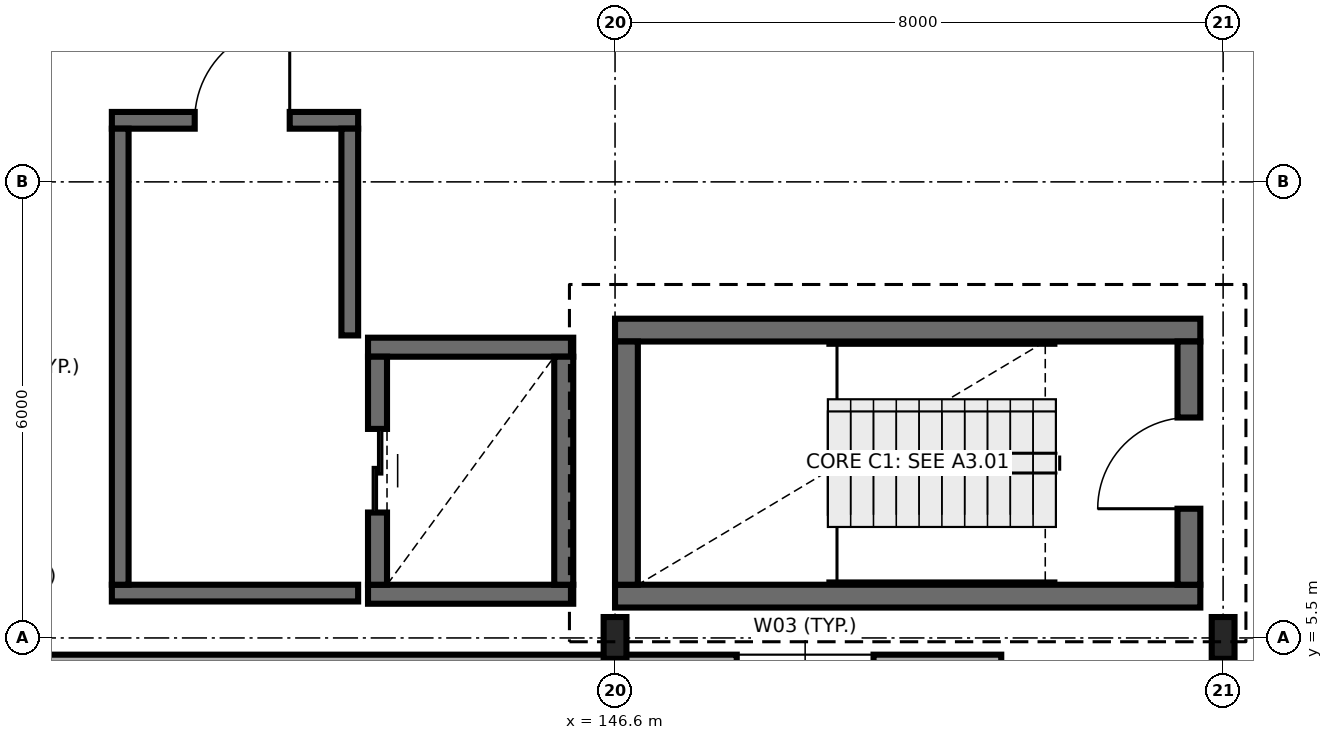
"""IFC4 building model, lengths in metres.
Left out: names, types, materials, properties, quantities, classifications, styles, units other than length and angle.
Written with IfcOpenShell. Run it as: python <this file> out.ifc"""

import sys

from ifc_helpers import new_model, si_unit, direction, frame, frame_2d, origin, origin_2d, place, context, subcontext, project, spatial, rectangle, i_section, extrude, element, fill, save


model = new_model("IFC4")
c1 = context("Model", 3, precision=1e-05, world=origin(), true_north=direction((0.0, 1.0)))
c2 = subcontext(c1, "Body", "Model", "MODEL_VIEW")
j1 = project(units=[si_unit("LENGTHUNIT", "METRE"), si_unit("PLANEANGLEUNIT", "RADIAN")], contexts=[c1])
p1 = place(None, origin())
s1 = spatial("IfcSite", under=j1, at=p1, CompositionType="ELEMENT")
p2 = place(p1, origin())
s2 = spatial("IfcBuilding", under=s1, at=p2, CompositionType="ELEMENT")
p3 = place(p2, frame((0.0, 0.0, 22.8)))
s3 = spatial("IfcBuildingStorey", under=s2, at=p3, CompositionType="ELEMENT", Elevation=22.8)
for number, where, z_axis, x_axis in (
    (1, (146.6, 5.5, 0.0), (0.0, 0.0, 1.0), (1.0, 0.0, 0.0)),
    (2, (154.6, 5.5, 0.0), (0.0, 0.0, 1.0), (1.0, 0.0, 0.0)),
):
    element("IfcColumn", number, at=place(p3, frame(where, z_axis=z_axis, x_axis=x_axis)), inside=s3, PredefinedType="COLUMN", context=c2, shape_type="SweptSolid", body=[
        extrude(i_section(OverallWidth=0.3, OverallDepth=0.55, WebThickness=0.015, FlangeThickness=0.029, FilletRadius=0.027, at=origin_2d()), origin(), (0.0, 0.0, 1.0), 3.9),
    ])
for number, where, z_axis, x_axis in (
    (3, (146.6, 6.05, 0.0), (0.0, 0.0, 1.0), (1.0, 0.0, 0.0)),
    (4, (154.3, 9.55, 0.0), (0.0, 0.0, 1.0), (-1.0, 0.0, 0.0)),
):
    element("IfcWall", number, at=place(p3, frame(where, z_axis=z_axis, x_axis=x_axis)), inside=s3, PredefinedType="SHEAR", context=c2, shape_type="SweptSolid", body=[
        extrude(rectangle(XDim=7.7, YDim=0.3, at=frame_2d((3.85, 0.0))), origin(), (0.0, 0.0, 1.0), 3.9),
    ])
p4 = place(p3, frame((146.75, 9.4, 0.0), z_axis=(0.0, 0.0, 1.0), x_axis=(0.0, -1.0, 0.0)))
e5 = element("IfcWall", 5, at=p4, inside=s3, PredefinedType="SHEAR", context=c2, shape_type="SweptSolid", body=[
    extrude(rectangle(XDim=3.2, YDim=0.3, at=frame_2d((1.6, 0.0))), origin(), (0.0, 0.0, 1.0), 3.9),
])
p5 = place(p3, frame((154.15, 6.2, 0.0), z_axis=(0.0, 0.0, 1.0), x_axis=(0.0, 1.0, 0.0)))
e6 = element("IfcWall", 6, at=p5, inside=s3, PredefinedType="SHEAR", context=c2, shape_type="SweptSolid", body=[
    extrude(rectangle(XDim=3.2, YDim=0.3, at=frame_2d((1.6, 0.0))), origin(), (0.0, 0.0, 1.0), 3.9),
])
p6 = place(p5, frame((1.0, 0.0, 0.0)))
e7 = element("IfcOpeningElement", 7, at=p6, cuts=e6, PredefinedType="OPENING", context=c2, shape_type="SweptSolid", body=[
    extrude(rectangle(XDim=1.2, YDim=2.15, at=frame_2d((0.6, 1.075))), frame((0.0, 0.16, 0.0), z_axis=(0.0, -1.0, 0.0), x_axis=(1.0, 0.0, 0.0)), (0.0, 0.0, 1.0), 0.32),
])
for number, where, z_axis, x_axis in (
    (8, (143.35, 6.075, 0.0), (0.0, 0.0, 1.0), (1.0, 0.0, 0.0)),
    (9, (146.05, 9.325, 0.0), (0.0, 0.0, 1.0), (-1.0, 0.0, 0.0)),
):
    element("IfcWall", number, at=place(p3, frame(where, z_axis=z_axis, x_axis=x_axis)), inside=s3, PredefinedType="SHEAR", context=c2, shape_type="SweptSolid", body=[
        extrude(rectangle(XDim=2.7, YDim=0.25, at=frame_2d((1.35, 0.0))), origin(), (0.0, 0.0, 1.0), 3.9),
    ])
p7 = place(p3, frame((143.475, 9.2, 0.0), z_axis=(0.0, 0.0, 1.0), x_axis=(0.0, -1.0, 0.0)))
e10 = element("IfcWall", 10, at=p7, inside=s3, PredefinedType="SHEAR", context=c2, shape_type="SweptSolid", body=[
    extrude(rectangle(XDim=3.0, YDim=0.25, at=frame_2d((1.5, 0.0))), origin(), (0.0, 0.0, 1.0), 3.9),
])
p8 = place(p7, frame((0.95, 0.0, 0.0)))
e11 = element("IfcOpeningElement", 11, at=p8, cuts=e10, PredefinedType="OPENING", context=c2, shape_type="SweptSolid", body=[
    extrude(rectangle(XDim=1.1, YDim=2.15, at=frame_2d((0.55, 1.075))), frame((0.0, 0.135, 0.0), z_axis=(0.0, -1.0, 0.0), x_axis=(1.0, 0.0, 0.0)), (0.0, 0.0, 1.0), 0.27),
])
p9 = place(p3, frame((145.925, 6.2, 0.0), z_axis=(0.0, 0.0, 1.0), x_axis=(0.0, 1.0, 0.0)))
e12 = element("IfcWall", 12, at=p9, inside=s3, PredefinedType="SHEAR", context=c2, shape_type="SweptSolid", body=[
    extrude(rectangle(XDim=3.0, YDim=0.25, at=frame_2d((1.5, 0.0))), origin(), (0.0, 0.0, 1.0), 3.9),
])
p10 = place(p3, frame((139.98, 6.09, 0.0), z_axis=(0.0, 0.0, 1.0), x_axis=(1.0, 0.0, 0.0)))
e13 = element("IfcWall", 13, at=p10, inside=s3, PredefinedType="SOLIDWALL", context=c2, shape_type="SweptSolid", body=[
    extrude(rectangle(XDim=3.24, YDim=0.22, at=frame_2d((1.62, 0.0))), origin(), (0.0, 0.0, 1.0), 3.68),
])
p11 = place(p3, frame((143.22, 12.31, 0.0), z_axis=(0.0, 0.0, 1.0), x_axis=(-1.0, 0.0, 0.0)))
e14 = element("IfcWall", 14, at=p11, inside=s3, PredefinedType="SOLIDWALL", context=c2, shape_type="SweptSolid", body=[
    extrude(rectangle(XDim=3.24, YDim=0.22, at=frame_2d((1.62, 0.0))), origin(), (0.0, 0.0, 1.0), 3.68),
])
p12 = place(p11, frame((0.9, 0.0, 0.0)))
e15 = element("IfcOpeningElement", 15, at=p12, cuts=e14, PredefinedType="OPENING", context=c2, shape_type="SweptSolid", body=[
    extrude(rectangle(XDim=1.25, YDim=2.15, at=frame_2d((0.625, 1.075))), frame((0.0, 0.12, 0.0), z_axis=(0.0, -1.0, 0.0), x_axis=(1.0, 0.0, 0.0)), (0.0, 0.0, 1.0), 0.24),
])
p13 = place(p3, frame((140.09, 12.2, 0.0), z_axis=(0.0, 0.0, 1.0), x_axis=(0.0, -1.0, 0.0)))
e16 = element("IfcWall", 16, at=p13, inside=s3, PredefinedType="SOLIDWALL", context=c2, shape_type="SweptSolid", body=[
    extrude(rectangle(XDim=6.0, YDim=0.22, at=frame_2d((3.0, 0.0))), origin(), (0.0, 0.0, 1.0), 3.68),
])
p14 = place(p3, frame((143.11, 9.48, 0.0), z_axis=(0.0, 0.0, 1.0), x_axis=(0.0, 1.0, 0.0)))
e17 = element("IfcWall", 17, at=p14, inside=s3, PredefinedType="SOLIDWALL", context=c2, shape_type="SweptSolid", body=[
    extrude(rectangle(XDim=2.72, YDim=0.22, at=frame_2d((1.36, 0.0))), origin(), (0.0, 0.0, 1.0), 3.68),
])
p15 = place(p3, frame((138.962, 5.09, 0.0), z_axis=(0.0, 0.0, 1.0), x_axis=(1.0, 0.0, 0.0)))
e18 = element("IfcWall", 18, at=p15, inside=s3, PredefinedType="SOLIDWALL", context=c2, shape_type="SweptSolid", body=[
    extrude(rectangle(XDim=12.719, YDim=0.38, at=frame_2d((6.359, 0.0))), origin(), (0.0, 0.0, 1.0), 3.68),
])
p16 = place(p15, frame((9.239, 0.0, 0.9)))
e19 = element("IfcOpeningElement", 19, at=p16, cuts=e18, PredefinedType="OPENING", context=c2, shape_type="SweptSolid", body=[
    extrude(rectangle(XDim=1.8, YDim=1.8, at=frame_2d((0.9, 0.9))), frame((0.0, 0.2, 0.0), z_axis=(0.0, -1.0, 0.0), x_axis=(1.0, 0.0, 0.0)), (0.0, 0.0, 1.0), 0.4),
])
p17 = place(p6, origin())
e20 = element("IfcDoor", 20, at=p17, inside=s3, OperationType="SINGLE_SWING_LEFT", PredefinedType="DOOR", context=c2, shape_type="SweptSolid", body=[
    extrude(rectangle(XDim=1.2, YDim=2.15, at=frame_2d((0.6, 1.075))), frame((0.0, 0.025, 0.0), z_axis=(0.0, -1.0, 0.0), x_axis=(1.0, 0.0, 0.0)), (0.0, 0.0, 1.0), 0.05),
])
fill(e7, e20)
p18 = place(p8, origin())
e21 = element("IfcDoor", 21, at=p18, inside=s3, OperationType="DOUBLE_DOOR_SLIDING", PredefinedType="DOOR", context=c2, shape_type="SweptSolid", body=[
    extrude(rectangle(XDim=1.1, YDim=2.15, at=frame_2d((0.55, 1.075))), frame((0.0, 0.025, 0.0), z_axis=(0.0, -1.0, 0.0), x_axis=(1.0, 0.0, 0.0)), (0.0, 0.0, 1.0), 0.05),
])
fill(e11, e21)
p19 = place(p12, frame((1.25, 0.0, 0.0), z_axis=(0.0, 0.0, 1.0), x_axis=(-1.0, 0.0, 0.0)))
e22 = element("IfcDoor", 22, at=p19, inside=s3, OperationType="SINGLE_SWING_LEFT", PredefinedType="DOOR", context=c2, shape_type="SweptSolid", body=[
    extrude(rectangle(XDim=1.25, YDim=2.15, at=frame_2d((0.625, 1.075))), frame((0.0, 0.025, 0.0), z_axis=(0.0, -1.0, 0.0), x_axis=(1.0, 0.0, 0.0)), (0.0, 0.0, 1.0), 0.05),
])
fill(e15, e22)
save(model, sys.argv[1])
